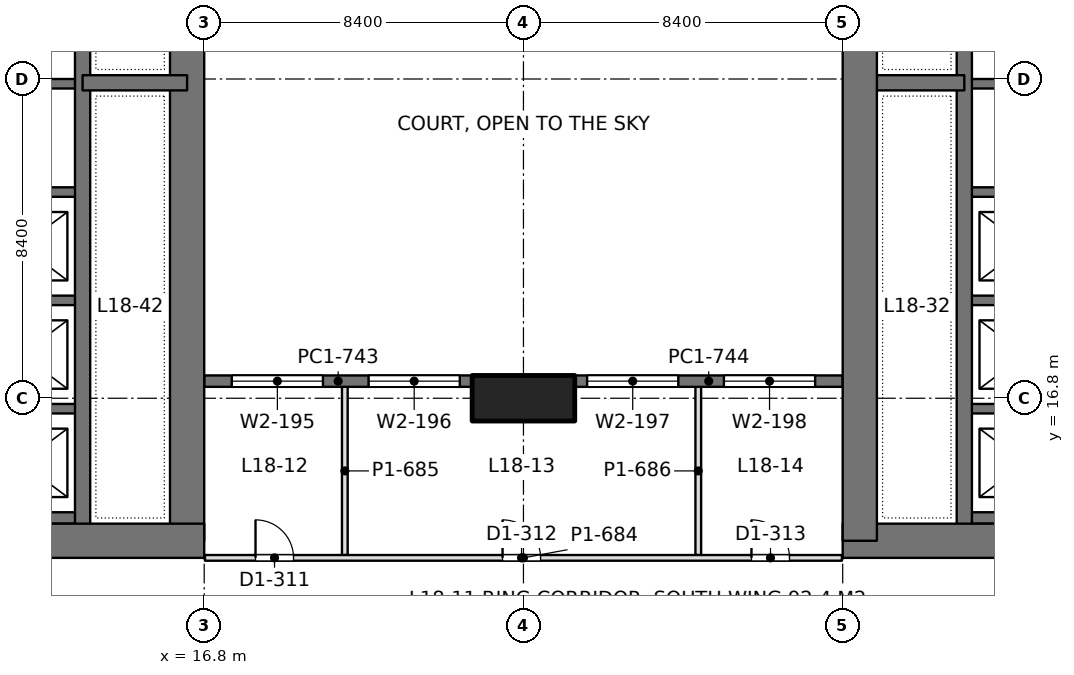
"""IFC4 building model, lengths in metres.
Left out: names, types, materials, properties, quantities, classifications, styles, units other than length and angle.
Written with IfcOpenShell. Run it as: python <this file> out.ifc"""

import sys

from ifc_helpers import new_model, si_unit, direction, frame, frame_2d, origin, origin_2d, place, context, subcontext, project, spatial, rectangle, extrude, element, fill, save


model = new_model("IFC4")
c1 = context("Model", 3, precision=1e-05, world=origin(), true_north=direction((0.0, 1.0)))
c2 = subcontext(c1, "Body", "Model", "MODEL_VIEW")
j1 = project(units=[si_unit("LENGTHUNIT", "METRE"), si_unit("PLANEANGLEUNIT", "RADIAN")], contexts=[c1])
p1 = place(None, origin())
s1 = spatial("IfcSite", under=j1, at=p1, CompositionType="ELEMENT")
p2 = place(p1, origin())
s2 = spatial("IfcBuilding", under=s1, at=p2, CompositionType="ELEMENT")
p3 = place(p2, frame((0.0, 0.0, 81.9)))
s3 = spatial("IfcBuildingStorey", under=s2, at=p3, CompositionType="ELEMENT", Elevation=81.9)
p4 = place(p3, frame((25.2, 16.8, 0.0), z_axis=(0.0, 0.0, 1.0), x_axis=(1.0, 0.0, 0.0)))
e1 = element("IfcColumn", 1, at=p4, inside=s3, PredefinedType="COLUMN", context=c2, shape_type="SweptSolid", body=[
    extrude(rectangle(XDim=2.7, YDim=1.2, at=origin_2d()), origin(), (0.0, 0.0, 1.0), 4.5),
])
p5 = place(p3, frame((-1.2, 13.05, 0.0), z_axis=(0.0, 0.0, 1.0), x_axis=(1.0, 0.0, 0.0)))
e2 = element("IfcWall", 2, at=p5, inside=s3, PredefinedType="SHEAR", context=c2, shape_type="SweptSolid", body=[
    extrude(rectangle(XDim=18.0, YDim=0.9, at=frame_2d((9.0, 0.0))), origin(), (0.0, 0.0, 1.0), 4.5),
])
p6 = place(p5, frame((8.95, 0.0, 0.0)))
e3 = element("IfcOpeningElement", 3, at=p6, cuts=e2, PredefinedType="OPENING", context=c2, shape_type="SweptSolid", body=[
    extrude(rectangle(XDim=1.8, YDim=2.4, at=frame_2d((0.9, 1.2))), frame((0.0, 0.46, 0.0), z_axis=(0.0, -1.0, 0.0), x_axis=(1.0, 0.0, 0.0)), (0.0, 0.0, 1.0), 0.92),
])
p7 = place(p3, frame((16.35, 13.05, 0.0), z_axis=(0.0, 0.0, 1.0), x_axis=(0.0, 1.0, 0.0)))
e4 = element("IfcWall", 4, at=p7, inside=s3, PredefinedType="SHEAR", context=c2, shape_type="SweptSolid", body=[
    extrude(rectangle(XDim=24.3, YDim=0.9, at=frame_2d((12.15, 0.0))), origin(), (0.0, 0.0, 1.0), 4.5),
])
p8 = place(p3, frame((13.6, 13.05, 0.0), z_axis=(0.0, 0.0, 1.0), x_axis=(0.0, 1.0, 0.0)))
e5 = element("IfcWall", 5, at=p8, inside=s3, PredefinedType="SHEAR", context=c2, shape_type="SweptSolid", body=[
    extrude(rectangle(XDim=24.3, YDim=0.4, at=frame_2d((12.15, 0.0))), origin(), (0.0, 0.0, 1.0), 4.5),
])
p9 = place(p3, frame((13.6, 25.1, 0.0), z_axis=(0.0, 0.0, 1.0), x_axis=(1.0, 0.0, 0.0)))
e6 = element("IfcWall", 6, at=p9, inside=s3, PredefinedType="SHEAR", context=c2, shape_type="SweptSolid", body=[
    extrude(rectangle(XDim=2.75, YDim=0.4, at=frame_2d((1.375, 0.0))), origin(), (0.0, 0.0, 1.0), 4.5),
])
p10 = place(p3, frame((10.4, 13.65, 0.0), z_axis=(0.0, 0.0, 1.0), x_axis=(1.0, 0.0, 0.0)))
e7 = element("IfcWall", 7, at=p10, inside=s3, PredefinedType="SHEAR", context=c2, shape_type="SweptSolid", body=[
    extrude(rectangle(XDim=3.2, YDim=0.3, at=frame_2d((1.6, 0.0))), origin(), (0.0, 0.0, 1.0), 4.5),
])
for number, where, z_axis, x_axis in (
    (8, (10.4, 16.525, 0.0), (0.0, 0.0, 1.0), (1.0, 0.0, 0.0)),
    (9, (10.4, 19.375, 0.0), (0.0, 0.0, 1.0), (1.0, 0.0, 0.0)),
    (10, (10.4, 22.225, 0.0), (0.0, 0.0, 1.0), (1.0, 0.0, 0.0)),
    (11, (10.4, 25.075, 0.0), (0.0, 0.0, 1.0), (1.0, 0.0, 0.0)),
):
    element("IfcWall", number, at=place(p3, frame(where, z_axis=z_axis, x_axis=x_axis)), inside=s3, PredefinedType="SHEAR", context=c2, shape_type="SweptSolid", body=[
        extrude(rectangle(XDim=3.2, YDim=0.25, at=frame_2d((1.6, 0.0))), origin(), (0.0, 0.0, 1.0), 4.5),
    ])
p11 = place(p3, frame((33.6, 13.05, 0.0), z_axis=(0.0, 0.0, 1.0), x_axis=(1.0, 0.0, 0.0)))
e12 = element("IfcWall", 12, at=p11, inside=s3, PredefinedType="SHEAR", context=c2, shape_type="SweptSolid", body=[
    extrude(rectangle(XDim=18.0, YDim=0.9, at=frame_2d((9.0, 0.0))), origin(), (0.0, 0.0, 1.0), 4.5),
])
p12 = place(p11, frame((7.25, 0.0, 0.0)))
e13 = element("IfcOpeningElement", 13, at=p12, cuts=e12, PredefinedType="OPENING", context=c2, shape_type="SweptSolid", body=[
    extrude(rectangle(XDim=1.8, YDim=2.4, at=frame_2d((0.9, 1.2))), frame((0.0, 0.46, 0.0), z_axis=(0.0, -1.0, 0.0), x_axis=(1.0, 0.0, 0.0)), (0.0, 0.0, 1.0), 0.92),
])
p13 = place(p3, frame((34.05, 13.05, 0.0), z_axis=(0.0, 0.0, 1.0), x_axis=(0.0, 1.0, 0.0)))
e14 = element("IfcWall", 14, at=p13, inside=s3, PredefinedType="SHEAR", context=c2, shape_type="SweptSolid", body=[
    extrude(rectangle(XDim=24.3, YDim=0.9, at=frame_2d((12.15, 0.0))), origin(), (0.0, 0.0, 1.0), 4.5),
])
p14 = place(p3, frame((36.8, 13.05, 0.0), z_axis=(0.0, 0.0, 1.0), x_axis=(0.0, 1.0, 0.0)))
e15 = element("IfcWall", 15, at=p14, inside=s3, PredefinedType="SHEAR", context=c2, shape_type="SweptSolid", body=[
    extrude(rectangle(XDim=24.3, YDim=0.4, at=frame_2d((12.15, 0.0))), origin(), (0.0, 0.0, 1.0), 4.5),
])
p15 = place(p3, frame((36.8, 25.1, 0.0), z_axis=(0.0, 0.0, 1.0), x_axis=(-1.0, 0.0, 0.0)))
e16 = element("IfcWall", 16, at=p15, inside=s3, PredefinedType="SHEAR", context=c2, shape_type="SweptSolid", body=[
    extrude(rectangle(XDim=2.75, YDim=0.4, at=frame_2d((1.375, 0.0))), origin(), (0.0, 0.0, 1.0), 4.5),
])
p16 = place(p3, frame((40.0, 13.65, 0.0), z_axis=(0.0, 0.0, 1.0), x_axis=(-1.0, 0.0, 0.0)))
e17 = element("IfcWall", 17, at=p16, inside=s3, PredefinedType="SHEAR", context=c2, shape_type="SweptSolid", body=[
    extrude(rectangle(XDim=3.2, YDim=0.3, at=frame_2d((1.6, 0.0))), origin(), (0.0, 0.0, 1.0), 4.5),
])
for number, where, z_axis, x_axis in (
    (18, (40.0, 16.525, 0.0), (0.0, 0.0, 1.0), (-1.0, 0.0, 0.0)),
    (19, (40.0, 19.375, 0.0), (0.0, 0.0, 1.0), (-1.0, 0.0, 0.0)),
    (20, (40.0, 22.225, 0.0), (0.0, 0.0, 1.0), (-1.0, 0.0, 0.0)),
    (21, (40.0, 25.075, 0.0), (0.0, 0.0, 1.0), (-1.0, 0.0, 0.0)),
):
    element("IfcWall", number, at=place(p3, frame(where, z_axis=z_axis, x_axis=x_axis)), inside=s3, PredefinedType="SHEAR", context=c2, shape_type="SweptSolid", body=[
        extrude(rectangle(XDim=3.2, YDim=0.25, at=frame_2d((1.6, 0.0))), origin(), (0.0, 0.0, 1.0), 4.5),
    ])
p17 = place(p3, frame((16.8, 17.25, 0.0), z_axis=(0.0, 0.0, 1.0), x_axis=(1.0, 0.0, 0.0)))
e22 = element("IfcWall", 22, at=p17, inside=s3, PredefinedType="SOLIDWALL", context=c2, shape_type="SweptSolid", body=[
    extrude(rectangle(XDim=7.05, YDim=0.3, at=frame_2d((3.525, 0.0))), origin(), (0.0, 0.0, 1.0), 4.34),
])
p18 = place(p17, frame((0.725, 0.0, 0.9)))
e23 = element("IfcOpeningElement", 23, at=p18, cuts=e22, PredefinedType="OPENING", context=c2, shape_type="SweptSolid", body=[
    extrude(rectangle(XDim=2.4, YDim=1.9, at=frame_2d((1.2, 0.95))), frame((0.0, 0.16, 0.0), z_axis=(0.0, -1.0, 0.0), x_axis=(1.0, 0.0, 0.0)), (0.0, 0.0, 1.0), 0.32),
])
p19 = place(p17, frame((4.325, 0.0, 0.9)))
e24 = element("IfcOpeningElement", 24, at=p19, cuts=e22, PredefinedType="OPENING", context=c2, shape_type="SweptSolid", body=[
    extrude(rectangle(XDim=2.4, YDim=1.9, at=frame_2d((1.2, 0.95))), frame((0.0, 0.16, 0.0), z_axis=(0.0, -1.0, 0.0), x_axis=(1.0, 0.0, 0.0)), (0.0, 0.0, 1.0), 0.32),
])
p20 = place(p3, frame((26.55, 17.25, 0.0), z_axis=(0.0, 0.0, 1.0), x_axis=(1.0, 0.0, 0.0)))
e25 = element("IfcWall", 25, at=p20, inside=s3, PredefinedType="SOLIDWALL", context=c2, shape_type="SweptSolid", body=[
    extrude(rectangle(XDim=7.05, YDim=0.3, at=frame_2d((3.525, 0.0))), origin(), (0.0, 0.0, 1.0), 4.34),
])
p21 = place(p20, frame((0.325, 0.0, 0.9)))
e26 = element("IfcOpeningElement", 26, at=p21, cuts=e25, PredefinedType="OPENING", context=c2, shape_type="SweptSolid", body=[
    extrude(rectangle(XDim=2.4, YDim=1.9, at=frame_2d((1.2, 0.95))), frame((0.0, 0.16, 0.0), z_axis=(0.0, -1.0, 0.0), x_axis=(1.0, 0.0, 0.0)), (0.0, 0.0, 1.0), 0.32),
])
p22 = place(p20, frame((3.925, 0.0, 0.9)))
e27 = element("IfcOpeningElement", 27, at=p22, cuts=e25, PredefinedType="OPENING", context=c2, shape_type="SweptSolid", body=[
    extrude(rectangle(XDim=2.4, YDim=1.9, at=frame_2d((1.2, 0.95))), frame((0.0, 0.16, 0.0), z_axis=(0.0, -1.0, 0.0), x_axis=(1.0, 0.0, 0.0)), (0.0, 0.0, 1.0), 0.32),
])
for number, where, z_axis, x_axis in (
    (28, (20.5, 12.674, 0.0), (0.0, 0.0, 1.0), (0.0, 1.0, 0.0)),
    (29, (29.8, 12.674, 0.0), (0.0, 0.0, 1.0), (0.0, 1.0, 0.0)),
):
    element("IfcWall", number, at=place(p3, frame(where, z_axis=z_axis, x_axis=x_axis)), inside=s3, PredefinedType="PARTITIONING", context=c2, shape_type="SweptSolid", body=[
        extrude(rectangle(XDim=4.428, YDim=0.15, at=frame_2d((2.214, 0.0))), origin(), (0.0, 0.0, 1.0), 3.65),
    ])
p23 = place(p3, frame((16.82, 12.6, 0.0), z_axis=(0.0, 0.0, 1.0), x_axis=(1.0, 0.0, 0.0)))
e30 = element("IfcWall", 30, at=p23, inside=s3, PredefinedType="PARTITIONING", context=c2, shape_type="SweptSolid", body=[
    extrude(rectangle(XDim=16.76, YDim=0.15, at=frame_2d((8.38, 0.0))), origin(), (0.0, 0.0, 1.0), 3.74),
])
p24 = place(p23, frame((1.33, 0.0, 0.0)))
e31 = element("IfcOpeningElement", 31, at=p24, cuts=e30, PredefinedType="OPENING", context=c2, shape_type="SweptSolid", body=[
    extrude(rectangle(XDim=1.0, YDim=2.2, at=frame_2d((0.5, 1.1))), frame((0.0, 0.085, 0.0), z_axis=(0.0, -1.0, 0.0), x_axis=(1.0, 0.0, 0.0)), (0.0, 0.0, 1.0), 0.17),
])
p25 = place(p23, frame((7.83, 0.0, 0.0)))
e32 = element("IfcOpeningElement", 32, at=p25, cuts=e30, PredefinedType="OPENING", context=c2, shape_type="SweptSolid", body=[
    extrude(rectangle(XDim=1.0, YDim=2.2, at=frame_2d((0.5, 1.1))), frame((0.0, 0.085, 0.0), z_axis=(0.0, -1.0, 0.0), x_axis=(1.0, 0.0, 0.0)), (0.0, 0.0, 1.0), 0.17),
])
p26 = place(p23, frame((14.38, 0.0, 0.0)))
e33 = element("IfcOpeningElement", 33, at=p26, cuts=e30, PredefinedType="OPENING", context=c2, shape_type="SweptSolid", body=[
    extrude(rectangle(XDim=1.0, YDim=2.2, at=frame_2d((0.5, 1.1))), frame((0.0, 0.085, 0.0), z_axis=(0.0, -1.0, 0.0), x_axis=(1.0, 0.0, 0.0)), (0.0, 0.0, 1.0), 0.17),
])
p27 = place(p18, origin())
e34 = element("IfcWindow", 34, at=p27, inside=s3, PartitioningType="SINGLE_PANEL", PredefinedType="WINDOW", context=c2, shape_type="SweptSolid", body=[
    extrude(rectangle(XDim=2.4, YDim=1.9, at=frame_2d((1.2, 0.95))), frame((0.0, 0.03, 0.0), z_axis=(0.0, -1.0, 0.0), x_axis=(1.0, 0.0, 0.0)), (0.0, 0.0, 1.0), 0.06),
])
fill(e23, e34)
p28 = place(p19, origin())
e35 = element("IfcWindow", 35, at=p28, inside=s3, PartitioningType="SINGLE_PANEL", PredefinedType="WINDOW", context=c2, shape_type="SweptSolid", body=[
    extrude(rectangle(XDim=2.4, YDim=1.9, at=frame_2d((1.2, 0.95))), frame((0.0, 0.03, 0.0), z_axis=(0.0, -1.0, 0.0), x_axis=(1.0, 0.0, 0.0)), (0.0, 0.0, 1.0), 0.06),
])
fill(e24, e35)
p29 = place(p21, origin())
e36 = element("IfcWindow", 36, at=p29, inside=s3, PartitioningType="SINGLE_PANEL", PredefinedType="WINDOW", context=c2, shape_type="SweptSolid", body=[
    extrude(rectangle(XDim=2.4, YDim=1.9, at=frame_2d((1.2, 0.95))), frame((0.0, 0.03, 0.0), z_axis=(0.0, -1.0, 0.0), x_axis=(1.0, 0.0, 0.0)), (0.0, 0.0, 1.0), 0.06),
])
fill(e26, e36)
p30 = place(p22, origin())
e37 = element("IfcWindow", 37, at=p30, inside=s3, PartitioningType="SINGLE_PANEL", PredefinedType="WINDOW", context=c2, shape_type="SweptSolid", body=[
    extrude(rectangle(XDim=2.4, YDim=1.9, at=frame_2d((1.2, 0.95))), frame((0.0, 0.03, 0.0), z_axis=(0.0, -1.0, 0.0), x_axis=(1.0, 0.0, 0.0)), (0.0, 0.0, 1.0), 0.06),
])
fill(e27, e37)
p31 = place(p24, origin())
e38 = element("IfcDoor", 38, at=p31, inside=s3, OperationType="SINGLE_SWING_LEFT", PredefinedType="DOOR", context=c2, shape_type="SweptSolid", body=[
    extrude(rectangle(XDim=1.0, YDim=2.2, at=frame_2d((0.5, 1.1))), frame((0.0, 0.025, 0.0), z_axis=(0.0, -1.0, 0.0), x_axis=(1.0, 0.0, 0.0)), (0.0, 0.0, 1.0), 0.05),
])
fill(e31, e38)
p32 = place(p25, origin())
e39 = element("IfcDoor", 39, at=p32, inside=s3, OperationType="SINGLE_SWING_LEFT", PredefinedType="DOOR", context=c2, shape_type="SweptSolid", body=[
    extrude(rectangle(XDim=1.0, YDim=2.2, at=frame_2d((0.5, 1.1))), frame((0.0, 0.025, 0.0), z_axis=(0.0, -1.0, 0.0), x_axis=(1.0, 0.0, 0.0)), (0.0, 0.0, 1.0), 0.05),
])
fill(e32, e39)
p33 = place(p26, origin())
e40 = element("IfcDoor", 40, at=p33, inside=s3, OperationType="SINGLE_SWING_LEFT", PredefinedType="DOOR", context=c2, shape_type="SweptSolid", body=[
    extrude(rectangle(XDim=1.0, YDim=2.2, at=frame_2d((0.5, 1.1))), frame((0.0, 0.025, 0.0), z_axis=(0.0, -1.0, 0.0), x_axis=(1.0, 0.0, 0.0)), (0.0, 0.0, 1.0), 0.05),
])
fill(e33, e40)
save(model, sys.argv[1])
